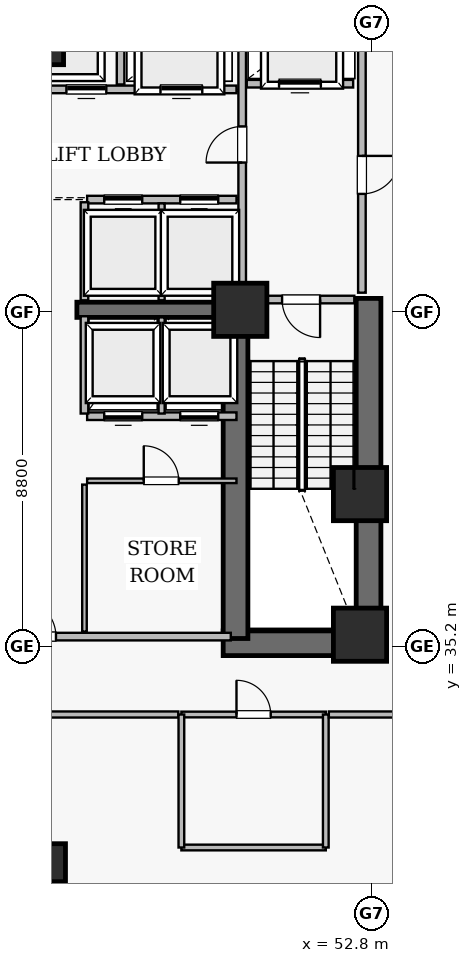
"""IFC4 building model, lengths in metres.
Left out: names, types, materials, properties, quantities, classifications, styles, units other than length and angle.
Written with IfcOpenShell. Run it as: python <this file> out.ifc"""

import sys

from ifc_helpers import new_model, si_unit, direction, frame, frame_2d, origin, origin_2d, place, context, subcontext, project, spatial, rectangle, extrude, element, fill, save


model = new_model("IFC4")
c1 = context("Model", 3, precision=1e-05, world=origin(), true_north=direction((0.0, 1.0)))
c2 = subcontext(c1, "Body", "Model", "MODEL_VIEW")
j1 = project(units=[si_unit("LENGTHUNIT", "METRE"), si_unit("PLANEANGLEUNIT", "RADIAN")], contexts=[c1])
p1 = place(None, origin())
s1 = spatial("IfcSite", under=j1, at=p1, CompositionType="ELEMENT")
p2 = place(p1, origin())
s2 = spatial("IfcBuilding", under=s1, at=p2, CompositionType="ELEMENT")
p3 = place(p2, origin())
s3 = spatial("IfcBuildingStorey", under=s2, at=p3, CompositionType="ELEMENT", Elevation=0.0)
p4 = place(p3, frame((48.9, 35.275, 0.0), z_axis=(0.0, 0.0, 1.0), x_axis=(1.0, 0.0, 0.0)))
e1 = element("IfcWall", 1, at=p4, inside=s3, PredefinedType="SHEAR", context=c2, shape_type="SweptSolid", body=[
    extrude(rectangle(XDim=4.15, YDim=0.65, at=frame_2d((2.075, 0.0))), origin(), (0.0, 0.0, 1.0), 4.5),
])
p5 = place(p3, frame((52.725, 34.95, 0.0), z_axis=(0.0, 0.0, 1.0), x_axis=(0.0, 1.0, 0.0)))
e2 = element("IfcWall", 2, at=p5, inside=s3, PredefinedType="SHEAR", context=c2, shape_type="SweptSolid", body=[
    extrude(rectangle(XDim=9.4, YDim=0.65, at=frame_2d((4.7, 0.0))), origin(), (0.0, 0.0, 1.0), 4.5),
])
p6 = place(p3, frame((49.225, 35.4, 0.0), z_axis=(0.0, 0.0, 1.0), x_axis=(0.0, 1.0, 0.0)))
e3 = element("IfcWall", 3, at=p6, inside=s3, PredefinedType="SHEAR", context=c2, shape_type="SweptSolid", body=[
    extrude(rectangle(XDim=8.95, YDim=0.65, at=frame_2d((4.475, 0.0))), origin(), (0.0, 0.0, 1.0), 4.5),
])
p7 = place(p3, frame((45.05, 44.05, 0.0), z_axis=(0.0, 0.0, 1.0), x_axis=(1.0, 0.0, 0.0)))
e4 = element("IfcWall", 4, at=p7, inside=s3, PredefinedType="SHEAR", context=c2, shape_type="SweptSolid", body=[
    extrude(rectangle(XDim=4.2, YDim=0.4, at=frame_2d((2.1, 0.0))), origin(), (0.0, 0.0, 1.0), 4.5),
])
for number, where, z_axis, x_axis in (
    (5, (52.5, 35.5, 0.0), (0.0, 0.0, 1.0), (1.0, 0.0, 0.0)),
    (6, (52.5, 39.2, 0.0), (0.0, 0.0, 1.0), (1.0, 0.0, 0.0)),
    (7, (49.35, 44.05, 0.0), (0.0, 0.0, 1.0), (1.0, 0.0, 0.0)),
    (8, (44.0, 51.2, 0.0), (0.0, 0.0, 1.0), (1.0, 0.0, 0.0)),
):
    element("IfcColumn", number, at=place(p3, frame(where, z_axis=z_axis, x_axis=x_axis)), inside=s3, PredefinedType="COLUMN", context=c2, shape_type="SweptSolid", body=[
        extrude(rectangle(XDim=1.4, YDim=1.4, at=origin_2d()), origin(), (0.0, 0.0, 1.0), 4.8),
    ])
p8 = place(p3, frame((44.0, 29.5, 0.0), z_axis=(0.0, 0.0, 1.0), x_axis=(1.0, 0.0, 0.0)))
e9 = element("IfcColumn", 9, at=p8, inside=s3, PredefinedType="COLUMN", context=c2, shape_type="SweptSolid", body=[
    extrude(rectangle(XDim=1.5, YDim=1.0, at=origin_2d()), origin(), (0.0, 0.0, 1.0), 4.8),
])
p9 = place(p3, frame((38.9, 35.45, 0.0), z_axis=(0.0, 0.0, 1.0), x_axis=(1.0, 0.0, 0.0)))
e10 = element("IfcWall", 10, at=p9, inside=s3, PredefinedType="SOLIDWALL", context=c2, shape_type="SweptSolid", body=[
    extrude(rectangle(XDim=10.2, YDim=0.2, at=frame_2d((5.1, 0.0))), origin(), (0.0, 0.0, 1.0), 4.5),
])
p10 = place(p9, frame((4.6, 0.0, 0.0)))
e11 = element("IfcOpeningElement", 11, at=p10, cuts=e10, PredefinedType="OPENING", context=c2, shape_type="SweptSolid", body=[
    extrude(rectangle(XDim=1.0, YDim=2.15, at=frame_2d((0.5, 1.075))), frame((0.0, 0.11, 0.0), z_axis=(0.0, -1.0, 0.0), x_axis=(1.0, 0.0, 0.0)), (0.0, 0.0, 1.0), 0.22),
])
p11 = place(p3, frame((52.55, 44.5, 0.0), z_axis=(0.0, 0.0, 1.0), x_axis=(0.0, 1.0, 0.0)))
e12 = element("IfcWall", 12, at=p11, inside=s3, PredefinedType="SOLIDWALL", context=c2, shape_type="SweptSolid", body=[
    extrude(rectangle(XDim=7.92, YDim=0.2, at=frame_2d((3.96, 0.0))), origin(), (0.0, 0.0, 1.0), 4.5),
])
p12 = place(p11, frame((2.6, 0.0, 0.0)))
e13 = element("IfcOpeningElement", 13, at=p12, cuts=e12, PredefinedType="OPENING", context=c2, shape_type="SweptSolid", body=[
    extrude(rectangle(XDim=1.0, YDim=2.15, at=frame_2d((0.5, 1.075))), frame((0.0, 0.11, 0.0), z_axis=(0.0, -1.0, 0.0), x_axis=(1.0, 0.0, 0.0)), (0.0, 0.0, 1.0), 0.22),
])
p13 = place(p3, frame((49.4, 44.5, 0.0), z_axis=(0.0, 0.0, 1.0), x_axis=(0.0, 1.0, 0.0)))
e14 = element("IfcWall", 14, at=p13, inside=s3, PredefinedType="SOLIDWALL", context=c2, shape_type="SweptSolid", body=[
    extrude(rectangle(XDim=7.92, YDim=0.2, at=frame_2d((3.96, 0.0))), origin(), (0.0, 0.0, 1.0), 3.588),
])
p14 = place(p13, frame((3.425, 0.0, 0.0)))
e15 = element("IfcOpeningElement", 15, at=p14, cuts=e14, PredefinedType="OPENING", context=c2, shape_type="SweptSolid", body=[
    extrude(rectangle(XDim=0.95, YDim=2.15, at=frame_2d((0.475, 1.075))), frame((0.0, 0.11, 0.0), z_axis=(0.0, -1.0, 0.0), x_axis=(1.0, 0.0, 0.0)), (0.0, 0.0, 1.0), 0.22),
])
p15 = place(p3, frame((44.25, 49.85, 0.0), z_axis=(0.0, 0.0, 1.0), x_axis=(1.0, 0.0, 0.0)))
e16 = element("IfcWall", 16, at=p15, inside=s3, PredefinedType="SOLIDWALL", context=c2, shape_type="SweptSolid", body=[
    extrude(rectangle(XDim=5.0, YDim=0.2, at=frame_2d((2.5, 0.0))), origin(), (0.0, 0.0, 1.0), 3.588),
])
p16 = place(p15, frame((0.525, 0.0, 0.0)))
e17 = element("IfcOpeningElement", 17, at=p16, cuts=e16, PredefinedType="OPENING", context=c2, shape_type="SweptSolid", body=[
    extrude(rectangle(XDim=1.05, YDim=2.15, at=frame_2d((0.525, 1.075))), frame((0.0, 0.11, 0.0), z_axis=(0.0, -1.0, 0.0), x_axis=(1.0, 0.0, 0.0)), (0.0, 0.0, 1.0), 0.22),
])
p17 = place(p15, frame((3.0, 0.0, 0.0)))
e18 = element("IfcOpeningElement", 18, at=p17, cuts=e16, PredefinedType="OPENING", context=c2, shape_type="SweptSolid", body=[
    extrude(rectangle(XDim=1.1, YDim=2.15, at=frame_2d((0.55, 1.075))), frame((0.0, 0.11, 0.0), z_axis=(0.0, -1.0, 0.0), x_axis=(1.0, 0.0, 0.0)), (0.0, 0.0, 1.0), 0.22),
])
p18 = place(p3, frame((45.32, 46.95, 0.0), z_axis=(0.0, 0.0, 1.0), x_axis=(1.0, 0.0, 0.0)))
e19 = element("IfcWall", 19, at=p18, inside=s3, PredefinedType="SOLIDWALL", context=c2, shape_type="SweptSolid", body=[
    extrude(rectangle(XDim=3.93, YDim=0.2, at=frame_2d((1.965, 0.0))), origin(), (0.0, 0.0, 1.0), 3.588),
])
p19 = place(p18, frame((0.45, 0.0, 0.0)))
e20 = element("IfcOpeningElement", 20, at=p19, cuts=e19, PredefinedType="OPENING", context=c2, shape_type="SweptSolid", body=[
    extrude(rectangle(XDim=1.0, YDim=2.15, at=frame_2d((0.5, 1.075))), frame((0.0, 0.11, 0.0), z_axis=(0.0, -1.0, 0.0), x_axis=(1.0, 0.0, 0.0)), (0.0, 0.0, 1.0), 0.22),
])
p20 = place(p18, frame((2.45, 0.0, 0.0)))
e21 = element("IfcOpeningElement", 21, at=p20, cuts=e19, PredefinedType="OPENING", context=c2, shape_type="SweptSolid", body=[
    extrude(rectangle(XDim=1.0, YDim=2.15, at=frame_2d((0.5, 1.075))), frame((0.0, 0.11, 0.0), z_axis=(0.0, -1.0, 0.0), x_axis=(1.0, 0.0, 0.0)), (0.0, 0.0, 1.0), 0.22),
])
p21 = place(p3, frame((45.32, 41.25, 0.0), z_axis=(0.0, 0.0, 1.0), x_axis=(1.0, 0.0, 0.0)))
e22 = element("IfcWall", 22, at=p21, inside=s3, PredefinedType="SOLIDWALL", context=c2, shape_type="SweptSolid", body=[
    extrude(rectangle(XDim=3.93, YDim=0.2, at=frame_2d((1.965, 0.0))), origin(), (0.0, 0.0, 1.0), 4.5),
])
p22 = place(p21, frame((0.45, 0.0, 0.0)))
e23 = element("IfcOpeningElement", 23, at=p22, cuts=e22, PredefinedType="OPENING", context=c2, shape_type="SweptSolid", body=[
    extrude(rectangle(XDim=1.0, YDim=2.15, at=frame_2d((0.5, 1.075))), frame((0.0, 0.11, 0.0), z_axis=(0.0, -1.0, 0.0), x_axis=(1.0, 0.0, 0.0)), (0.0, 0.0, 1.0), 0.22),
])
p23 = place(p21, frame((2.45, 0.0, 0.0)))
e24 = element("IfcOpeningElement", 24, at=p23, cuts=e22, PredefinedType="OPENING", context=c2, shape_type="SweptSolid", body=[
    extrude(rectangle(XDim=1.0, YDim=2.15, at=frame_2d((0.5, 1.075))), frame((0.0, 0.11, 0.0), z_axis=(0.0, -1.0, 0.0), x_axis=(1.0, 0.0, 0.0)), (0.0, 0.0, 1.0), 0.22),
])
p24 = place(p3, frame((45.32, 39.55, 0.0), z_axis=(0.0, 0.0, 1.0), x_axis=(1.0, 0.0, 0.0)))
e25 = element("IfcWall", 25, at=p24, inside=s3, PredefinedType="PARTITIONING", context=c2, shape_type="SweptSolid", body=[
    extrude(rectangle(XDim=3.93, YDim=0.12, at=frame_2d((1.965, 0.0))), origin(), (0.0, 0.0, 1.0), 4.5),
])
p25 = place(p24, frame((1.49, 0.0, 0.0)))
e26 = element("IfcOpeningElement", 26, at=p25, cuts=e25, PredefinedType="OPENING", context=c2, shape_type="SweptSolid", body=[
    extrude(rectangle(XDim=0.92, YDim=2.1, at=frame_2d((0.46, 1.05))), frame((0.0, 0.07, 0.0), z_axis=(0.0, -1.0, 0.0), x_axis=(1.0, 0.0, 0.0)), (0.0, 0.0, 1.0), 0.14),
])
p26 = place(p3, frame((47.8, 33.4, 0.0), z_axis=(0.0, 0.0, 1.0), x_axis=(1.0, 0.0, 0.0)))
e27 = element("IfcWall", 27, at=p26, inside=s3, PredefinedType="PLUMBINGWALL", context=c2, shape_type="SweptSolid", body=[
    extrude(rectangle(XDim=3.8, YDim=0.15, at=frame_2d((1.9, 0.0))), origin(), (0.0, 0.0, 1.0), 4.5),
])
p27 = place(p26, frame((1.45, 0.0, 0.0)))
e28 = element("IfcOpeningElement", 28, at=p27, cuts=e27, PredefinedType="OPENING", context=c2, shape_type="SweptSolid", body=[
    extrude(rectangle(XDim=0.9, YDim=2.1, at=frame_2d((0.45, 1.05))), frame((0.0, 0.085, 0.0), z_axis=(0.0, -1.0, 0.0), x_axis=(1.0, 0.0, 0.0)), (0.0, 0.0, 1.0), 0.17),
])
p28 = place(p3, frame((49.55, 44.32, 0.0), z_axis=(0.0, 0.0, 1.0), x_axis=(1.0, 0.0, 0.0)))
e29 = element("IfcWall", 29, at=p28, inside=s3, PredefinedType="SOLIDWALL", context=c2, shape_type="SweptSolid", body=[
    extrude(rectangle(XDim=2.8, YDim=0.2, at=frame_2d((1.4, 0.0))), origin(), (0.0, 0.0, 1.0), 3.588),
])
p29 = place(p28, frame((0.9, 0.0, 0.0)))
e30 = element("IfcOpeningElement", 30, at=p29, cuts=e29, PredefinedType="OPENING", context=c2, shape_type="SweptSolid", body=[
    extrude(rectangle(XDim=1.0, YDim=2.15, at=frame_2d((0.5, 1.075))), frame((0.0, 0.11, 0.0), z_axis=(0.0, -1.0, 0.0), x_axis=(1.0, 0.0, 0.0)), (0.0, 0.0, 1.0), 0.22),
])
p30 = place(p3, frame((49.52, 50.0, 0.0), z_axis=(0.0, 0.0, 1.0), x_axis=(1.0, 0.0, 0.0)))
e31 = element("IfcWall", 31, at=p30, inside=s3, PredefinedType="SOLIDWALL", context=c2, shape_type="SweptSolid", body=[
    extrude(rectangle(XDim=2.8, YDim=0.2, at=frame_2d((1.4, 0.0))), origin(), (0.0, 0.0, 1.0), 4.5),
])
p31 = place(p30, frame((0.85, 0.0, 0.0)))
e32 = element("IfcOpeningElement", 32, at=p31, cuts=e31, PredefinedType="OPENING", context=c2, shape_type="SweptSolid", body=[
    extrude(rectangle(XDim=1.1, YDim=2.15, at=frame_2d((0.55, 1.075))), frame((0.0, 0.11, 0.0), z_axis=(0.0, -1.0, 0.0), x_axis=(1.0, 0.0, 0.0)), (0.0, 0.0, 1.0), 0.22),
])
p32 = place(p3, frame((45.25, 35.58, 0.0), z_axis=(0.0, 0.0, 1.0), x_axis=(0.0, 1.0, 0.0)))
e33 = element("IfcWall", 33, at=p32, inside=s3, PredefinedType="PARTITIONING", context=c2, shape_type="SweptSolid", body=[
    extrude(rectangle(XDim=3.87, YDim=0.12, at=frame_2d((1.935, 0.0))), origin(), (0.0, 0.0, 1.0), 4.5),
])
p33 = place(p3, frame((47.8, 29.9, 0.0), z_axis=(0.0, 0.0, 1.0), x_axis=(1.0, 0.0, 0.0)))
e34 = element("IfcWall", 34, at=p33, inside=s3, PredefinedType="PLUMBINGWALL", context=c2, shape_type="SweptSolid", body=[
    extrude(rectangle(XDim=3.8, YDim=0.15, at=frame_2d((1.9, 0.0))), origin(), (0.0, 0.0, 1.0), 4.5),
])
p34 = place(p3, frame((44.08, 33.4, 0.0), z_axis=(0.0, 0.0, 1.0), x_axis=(1.0, 0.0, 0.0)))
e35 = element("IfcWall", 35, at=p34, inside=s3, PredefinedType="SOLIDWALL", context=c2, shape_type="SweptSolid", body=[
    extrude(rectangle(XDim=3.64, YDim=0.16, at=frame_2d((1.82, 0.0))), origin(), (0.0, 0.0, 1.0), 4.5),
])
for number, where, z_axis, x_axis in (
    (36, (47.8, 33.4, 0.0), (0.0, 0.0, 1.0), (0.0, -1.0, 0.0)),
    (37, (51.6, 29.9, 0.0), (0.0, 0.0, 1.0), (0.0, 1.0, 0.0)),
):
    element("IfcWall", number, at=place(p3, frame(where, z_axis=z_axis, x_axis=x_axis)), inside=s3, PredefinedType="PLUMBINGWALL", context=c2, shape_type="SweptSolid", body=[
        extrude(rectangle(XDim=3.5, YDim=0.15, at=frame_2d((1.75, 0.0))), origin(), (0.0, 0.0, 1.0), 4.5),
    ])
p35 = place(p3, frame((51.68, 33.4, 0.0), z_axis=(0.0, 0.0, 1.0), x_axis=(1.0, 0.0, 0.0)))
e38 = element("IfcWall", 38, at=p35, inside=s3, PredefinedType="SOLIDWALL", context=c2, shape_type="SweptSolid", body=[
    extrude(rectangle(XDim=2.84, YDim=0.16, at=frame_2d((1.42, 0.0))), origin(), (0.0, 0.0, 1.0), 4.5),
])
p36 = place(p3, frame((45.25, 44.3, 0.0), z_axis=(0.0, 0.0, 1.0), x_axis=(0.0, 1.0, 0.0)))
e39 = element("IfcWall", 39, at=p36, inside=s3, PredefinedType="SOLIDWALL", context=c2, shape_type="SweptSolid", body=[
    extrude(rectangle(XDim=2.58, YDim=0.2, at=frame_2d((1.29, 0.0))), origin(), (0.0, 0.0, 1.0), 4.5),
])
p37 = place(p3, frame((45.25, 41.32, 0.0), z_axis=(0.0, 0.0, 1.0), x_axis=(0.0, 1.0, 0.0)))
e40 = element("IfcWall", 40, at=p37, inside=s3, PredefinedType="SOLIDWALL", context=c2, shape_type="SweptSolid", body=[
    extrude(rectangle(XDim=2.56, YDim=0.2, at=frame_2d((1.28, 0.0))), origin(), (0.0, 0.0, 1.0), 4.5),
])
p38 = place(p3, frame((47.28, 44.3, 0.0), z_axis=(0.0, 0.0, 1.0), x_axis=(0.0, 1.0, 0.0)))
e41 = element("IfcWall", 41, at=p38, inside=s3, PredefinedType="SOLIDWALL", context=c2, shape_type="SweptSolid", body=[
    extrude(rectangle(XDim=2.55, YDim=0.16, at=frame_2d((1.275, 0.0))), origin(), (0.0, 0.0, 1.0), 3.588),
])
p39 = place(p3, frame((47.28, 41.32, 0.0), z_axis=(0.0, 0.0, 1.0), x_axis=(0.0, 1.0, 0.0)))
e42 = element("IfcWall", 42, at=p39, inside=s3, PredefinedType="SOLIDWALL", context=c2, shape_type="SweptSolid", body=[
    extrude(rectangle(XDim=2.53, YDim=0.16, at=frame_2d((1.265, 0.0))), origin(), (0.0, 0.0, 1.0), 4.5),
])
p40 = place(p3, frame((46.2, 49.98, 0.0), z_axis=(0.0, 0.0, 1.0), x_axis=(0.0, 1.0, 0.0)))
e43 = element("IfcWall", 43, at=p40, inside=s3, PredefinedType="SOLIDWALL", context=c2, shape_type="SweptSolid", body=[
    extrude(rectangle(XDim=2.37, YDim=0.2, at=frame_2d((1.185, 0.0))), origin(), (0.0, 0.0, 1.0), 4.5),
])
p41 = place(p29, frame((1.0, 0.0, 0.0), z_axis=(0.0, 0.0, 1.0), x_axis=(-1.0, 0.0, 0.0)))
e44 = element("IfcDoor", 44, at=p41, inside=s3, OperationType="SINGLE_SWING_RIGHT", PredefinedType="DOOR", context=c2, shape_type="SweptSolid", body=[
    extrude(rectangle(XDim=1.0, YDim=2.15, at=frame_2d((0.5, 1.075))), frame((0.0, 0.025, 0.0), z_axis=(0.0, -1.0, 0.0), x_axis=(1.0, 0.0, 0.0)), (0.0, 0.0, 1.0), 0.05),
])
fill(e30, e44)
p42 = place(p12, frame((1.0, 0.0, 0.0), z_axis=(0.0, 0.0, 1.0), x_axis=(-1.0, 0.0, 0.0)))
e45 = element("IfcDoor", 45, at=p42, inside=s3, OperationType="SINGLE_SWING_RIGHT", PredefinedType="DOOR", context=c2, shape_type="SweptSolid", body=[
    extrude(rectangle(XDim=1.0, YDim=2.15, at=frame_2d((0.5, 1.075))), frame((0.0, 0.025, 0.0), z_axis=(0.0, -1.0, 0.0), x_axis=(1.0, 0.0, 0.0)), (0.0, 0.0, 1.0), 0.05),
])
fill(e13, e45)
p43 = place(p14, origin())
e46 = element("IfcDoor", 46, at=p43, inside=s3, OperationType="SINGLE_SWING_LEFT", PredefinedType="DOOR", context=c2, shape_type="SweptSolid", body=[
    extrude(rectangle(XDim=0.95, YDim=2.15, at=frame_2d((0.475, 1.075))), frame((0.0, 0.025, 0.0), z_axis=(0.0, -1.0, 0.0), x_axis=(1.0, 0.0, 0.0)), (0.0, 0.0, 1.0), 0.05),
])
fill(e15, e46)
p44 = place(p31, origin())
e47 = element("IfcDoor", 47, at=p44, inside=s3, OperationType="SLIDING_TO_LEFT", PredefinedType="DOOR", context=c2, shape_type="SweptSolid", body=[
    extrude(rectangle(XDim=1.1, YDim=2.15, at=frame_2d((0.55, 1.075))), frame((0.0, 0.025, 0.0), z_axis=(0.0, -1.0, 0.0), x_axis=(1.0, 0.0, 0.0)), (0.0, 0.0, 1.0), 0.05),
])
fill(e32, e47)
p45 = place(p10, origin())
e48 = element("IfcDoor", 48, at=p45, inside=s3, OperationType="SINGLE_SWING_LEFT", PredefinedType="DOOR", context=c2, shape_type="SweptSolid", body=[
    extrude(rectangle(XDim=1.0, YDim=2.15, at=frame_2d((0.5, 1.075))), frame((0.0, 0.025, 0.0), z_axis=(0.0, -1.0, 0.0), x_axis=(1.0, 0.0, 0.0)), (0.0, 0.0, 1.0), 0.05),
])
fill(e11, e48)
p46 = place(p16, origin())
e49 = element("IfcDoor", 49, at=p46, inside=s3, OperationType="SLIDING_TO_LEFT", PredefinedType="DOOR", context=c2, shape_type="SweptSolid", body=[
    extrude(rectangle(XDim=1.05, YDim=2.15, at=frame_2d((0.525, 1.075))), frame((0.0, 0.025, 0.0), z_axis=(0.0, -1.0, 0.0), x_axis=(1.0, 0.0, 0.0)), (0.0, 0.0, 1.0), 0.05),
])
fill(e17, e49)
p47 = place(p17, origin())
e50 = element("IfcDoor", 50, at=p47, inside=s3, OperationType="SLIDING_TO_LEFT", PredefinedType="DOOR", context=c2, shape_type="SweptSolid", body=[
    extrude(rectangle(XDim=1.1, YDim=2.15, at=frame_2d((0.55, 1.075))), frame((0.0, 0.025, 0.0), z_axis=(0.0, -1.0, 0.0), x_axis=(1.0, 0.0, 0.0)), (0.0, 0.0, 1.0), 0.05),
])
fill(e18, e50)
p48 = place(p19, origin())
e51 = element("IfcDoor", 51, at=p48, inside=s3, OperationType="SLIDING_TO_LEFT", PredefinedType="DOOR", context=c2, shape_type="SweptSolid", body=[
    extrude(rectangle(XDim=1.0, YDim=2.15, at=frame_2d((0.5, 1.075))), frame((0.0, 0.025, 0.0), z_axis=(0.0, -1.0, 0.0), x_axis=(1.0, 0.0, 0.0)), (0.0, 0.0, 1.0), 0.05),
])
fill(e20, e51)
p49 = place(p20, origin())
e52 = element("IfcDoor", 52, at=p49, inside=s3, OperationType="SLIDING_TO_LEFT", PredefinedType="DOOR", context=c2, shape_type="SweptSolid", body=[
    extrude(rectangle(XDim=1.0, YDim=2.15, at=frame_2d((0.5, 1.075))), frame((0.0, 0.025, 0.0), z_axis=(0.0, -1.0, 0.0), x_axis=(1.0, 0.0, 0.0)), (0.0, 0.0, 1.0), 0.05),
])
fill(e21, e52)
p50 = place(p22, frame((1.0, 0.0, 0.0), z_axis=(0.0, 0.0, 1.0), x_axis=(-1.0, 0.0, 0.0)))
e53 = element("IfcDoor", 53, at=p50, inside=s3, OperationType="SLIDING_TO_LEFT", PredefinedType="DOOR", context=c2, shape_type="SweptSolid", body=[
    extrude(rectangle(XDim=1.0, YDim=2.15, at=frame_2d((0.5, 1.075))), frame((0.0, 0.025, 0.0), z_axis=(0.0, -1.0, 0.0), x_axis=(1.0, 0.0, 0.0)), (0.0, 0.0, 1.0), 0.05),
])
fill(e23, e53)
p51 = place(p23, frame((1.0, 0.0, 0.0), z_axis=(0.0, 0.0, 1.0), x_axis=(-1.0, 0.0, 0.0)))
e54 = element("IfcDoor", 54, at=p51, inside=s3, OperationType="SLIDING_TO_LEFT", PredefinedType="DOOR", context=c2, shape_type="SweptSolid", body=[
    extrude(rectangle(XDim=1.0, YDim=2.15, at=frame_2d((0.5, 1.075))), frame((0.0, 0.025, 0.0), z_axis=(0.0, -1.0, 0.0), x_axis=(1.0, 0.0, 0.0)), (0.0, 0.0, 1.0), 0.05),
])
fill(e24, e54)
p52 = place(p25, origin())
e55 = element("IfcDoor", 55, at=p52, inside=s3, OperationType="SINGLE_SWING_LEFT", PredefinedType="DOOR", context=c2, shape_type="SweptSolid", body=[
    extrude(rectangle(XDim=0.92, YDim=2.1, at=frame_2d((0.46, 1.05))), frame((0.0, 0.025, 0.0), z_axis=(0.0, -1.0, 0.0), x_axis=(1.0, 0.0, 0.0)), (0.0, 0.0, 1.0), 0.05),
])
fill(e26, e55)
p53 = place(p27, origin())
e56 = element("IfcDoor", 56, at=p53, inside=s3, OperationType="SINGLE_SWING_LEFT", PredefinedType="DOOR", context=c2, shape_type="SweptSolid", body=[
    extrude(rectangle(XDim=0.9, YDim=2.1, at=frame_2d((0.45, 1.05))), frame((0.0, 0.025, 0.0), z_axis=(0.0, -1.0, 0.0), x_axis=(1.0, 0.0, 0.0)), (0.0, 0.0, 1.0), 0.05),
])
fill(e28, e56)
save(model, sys.argv[1])
